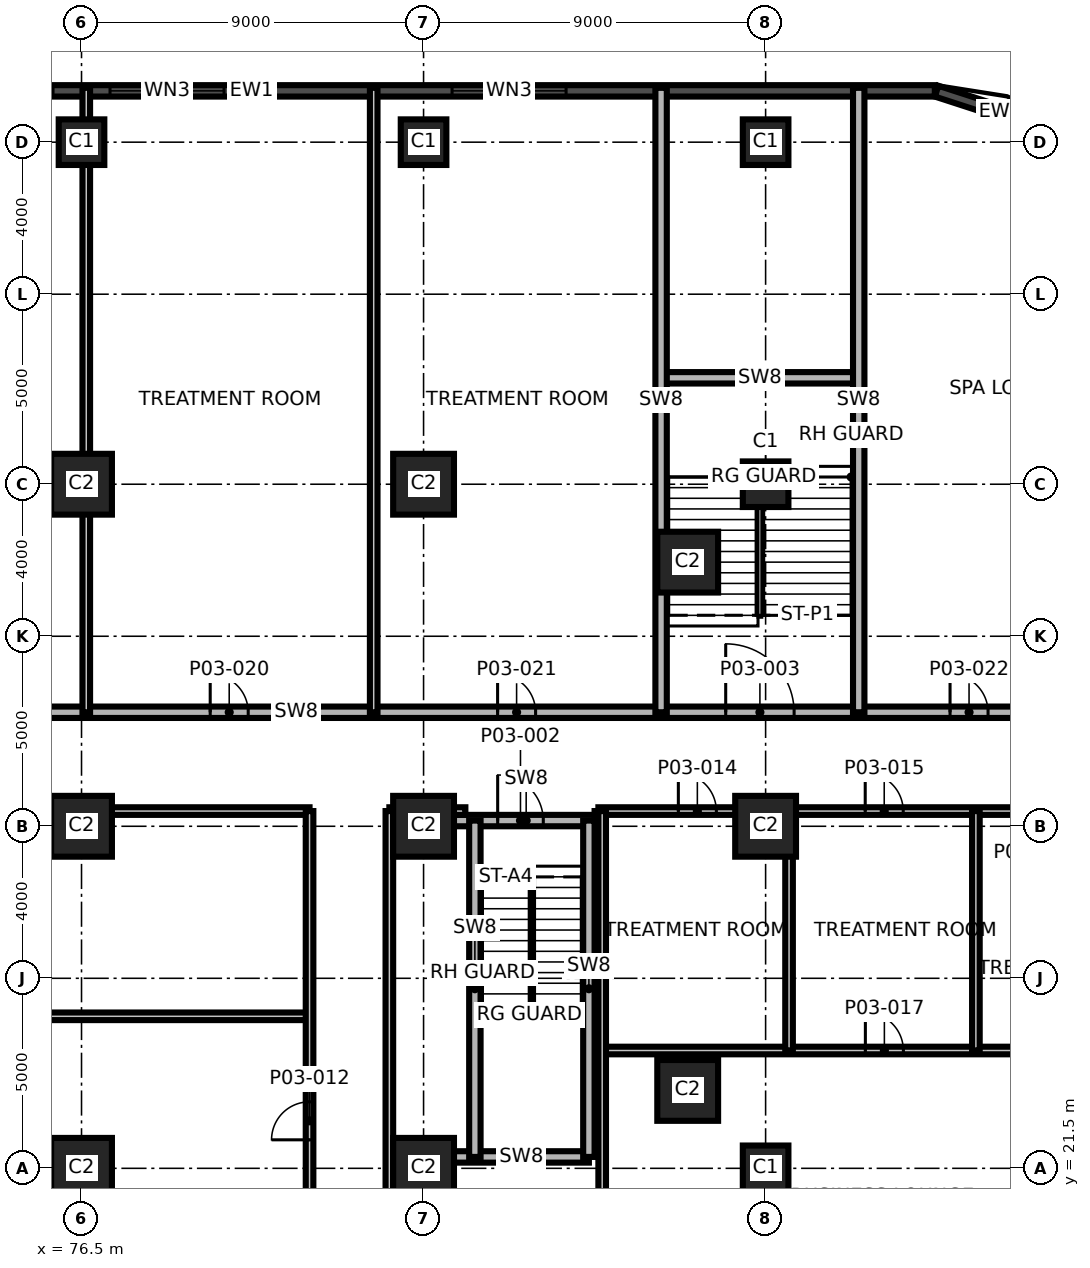
"""IFC4 building model, lengths in metres.
Left out: names, types, materials, properties, quantities, classifications, styles, units other than length and angle.
Written with IfcOpenShell. Run it as: python <this file> out.ifc"""

import sys

from ifc_helpers import new_model, si_unit, direction, frame, frame_2d, origin, origin_2d, place, context, subcontext, project, spatial, rectangle, extrude, element, fill, save


model = new_model("IFC4")
c1 = context("Model", 3, precision=1e-05, world=origin(), true_north=direction((0.0, 1.0)))
c2 = subcontext(c1, "Body", "Model", "MODEL_VIEW")
j1 = project(units=[si_unit("LENGTHUNIT", "METRE"), si_unit("PLANEANGLEUNIT", "RADIAN")], contexts=[c1])
p1 = place(None, origin())
s1 = spatial("IfcSite", under=j1, at=p1, CompositionType="ELEMENT")
p2 = place(p1, origin())
s2 = spatial("IfcBuilding", under=s1, at=p2, CompositionType="ELEMENT")
p3 = place(p2, frame((0.0, 0.0, 18.5)))
s3 = spatial("IfcBuildingStorey", under=s2, at=p3, CompositionType="ELEMENT", Elevation=18.5)
for number, where, z_axis, x_axis in (
    (1, (76.5, 21.5, 0.0), (0.0, 0.0, 1.0), (1.0, 0.0, 0.0)),
    (2, (85.5, 21.5, 0.0), (0.0, 0.0, 1.0), (1.0, 0.0, 0.0)),
):
    element("IfcColumn", number, at=place(p3, frame(where, z_axis=z_axis, x_axis=x_axis)), inside=s3, PredefinedType="COLUMN", context=c2, shape_type="SweptSolid", body=[
        extrude(rectangle(XDim=1.6, YDim=1.6, at=origin_2d()), origin(), (0.0, 0.0, 1.0), 5.0),
    ])
p4 = place(p3, frame((94.5, 21.5, 0.0), z_axis=(0.0, 0.0, 1.0), x_axis=(1.0, 0.0, 0.0)))
e3 = element("IfcColumn", 3, at=p4, inside=s3, PredefinedType="COLUMN", context=c2, shape_type="SweptSolid", body=[
    extrude(rectangle(XDim=1.2, YDim=1.2, at=origin_2d()), origin(), (0.0, 0.0, 1.0), 5.0),
])
for number, where, z_axis, x_axis in (
    (4, (76.5, 30.5, 0.0), (0.0, 0.0, 1.0), (1.0, 0.0, 0.0)),
    (5, (85.5, 30.5, 0.0), (0.0, 0.0, 1.0), (1.0, 0.0, 0.0)),
    (6, (94.5, 30.5, 0.0), (0.0, 0.0, 1.0), (1.0, 0.0, 0.0)),
    (7, (76.5, 39.5, 0.0), (0.0, 0.0, 1.0), (1.0, 0.0, 0.0)),
    (8, (85.5, 39.5, 0.0), (0.0, 0.0, 1.0), (1.0, 0.0, 0.0)),
):
    element("IfcColumn", number, at=place(p3, frame(where, z_axis=z_axis, x_axis=x_axis)), inside=s3, PredefinedType="COLUMN", context=c2, shape_type="SweptSolid", body=[
        extrude(rectangle(XDim=1.6, YDim=1.6, at=origin_2d()), origin(), (0.0, 0.0, 1.0), 5.0),
    ])
for number, where, z_axis, x_axis in (
    (9, (94.5, 39.5, 0.0), (0.0, 0.0, 1.0), (1.0, 0.0, 0.0)),
    (10, (76.5, 48.5, 0.0), (0.0, 0.0, 1.0), (1.0, 0.0, 0.0)),
    (11, (85.5, 48.5, 0.0), (0.0, 0.0, 1.0), (1.0, 0.0, 0.0)),
    (12, (94.5, 48.5, 0.0), (0.0, 0.0, 1.0), (1.0, 0.0, 0.0)),
):
    element("IfcColumn", number, at=place(p3, frame(where, z_axis=z_axis, x_axis=x_axis)), inside=s3, PredefinedType="COLUMN", context=c2, shape_type="SweptSolid", body=[
        extrude(rectangle(XDim=1.2, YDim=1.2, at=origin_2d()), origin(), (0.0, 0.0, 1.0), 5.0),
    ])
for number, where, z_axis, x_axis in (
    (13, (92.45, 23.55, 0.0), (0.0, 0.0, 1.0), (1.0, 0.0, 0.0)),
    (14, (92.45, 37.45, 0.0), (0.0, 0.0, 1.0), (1.0, 0.0, 0.0)),
):
    element("IfcColumn", number, at=place(p3, frame(where, z_axis=z_axis, x_axis=x_axis)), inside=s3, PredefinedType="COLUMN", context=c2, shape_type="SweptSolid", body=[
        extrude(rectangle(XDim=1.6, YDim=1.6, at=origin_2d()), origin(), (0.0, 0.0, 1.0), 5.0),
    ])
p5 = place(p3, frame((102.362, 48.75, 0.0), z_axis=(0.0, 0.0, 1.0), x_axis=(-0.951038127287, 0.309073584194, 0.0)))
e15 = element("IfcWall", 15, at=p5, inside=s3, PredefinedType="SOLIDWALL", context=c2, shape_type="SweptSolid", body=[
    extrude(rectangle(XDim=3.536, YDim=0.3, at=frame_2d((1.768, 0.0))), origin(), (0.0, 0.0, 1.0), 4.7),
])
p6 = place(p3, frame((98.952, 49.85, 0.0), z_axis=(0.0, 0.0, 1.0), x_axis=(-1.0, 0.0, 0.0)))
e16 = element("IfcWall", 16, at=p6, inside=s3, PredefinedType="SOLIDWALL", context=c2, shape_type="SweptSolid", body=[
    extrude(rectangle(XDim=35.952, YDim=0.3, at=frame_2d((17.976, 0.0))), origin(), (0.0, 0.0, 1.0), 4.7),
])
p7 = place(p6, frame((9.702, 0.0, 0.9)))
e17 = element("IfcOpeningElement", 17, at=p7, cuts=e16, PredefinedType="OPENING", context=c2, shape_type="SweptSolid", body=[
    extrude(rectangle(XDim=3.0, YDim=2.4, at=frame_2d((1.5, 1.2))), frame((0.0, 0.16, 0.0), z_axis=(0.0, -1.0, 0.0), x_axis=(1.0, 0.0, 0.0)), (0.0, 0.0, 1.0), 0.32),
])
p8 = place(p6, frame((18.702, 0.0, 0.9)))
e18 = element("IfcOpeningElement", 18, at=p8, cuts=e16, PredefinedType="OPENING", context=c2, shape_type="SweptSolid", body=[
    extrude(rectangle(XDim=3.0, YDim=2.4, at=frame_2d((1.5, 1.2))), frame((0.0, 0.16, 0.0), z_axis=(0.0, -1.0, 0.0), x_axis=(1.0, 0.0, 0.0)), (0.0, 0.0, 1.0), 0.32),
])
p9 = place(p6, frame((23.202, 0.0, 0.9)))
e19 = element("IfcOpeningElement", 19, at=p9, cuts=e16, PredefinedType="OPENING", context=c2, shape_type="SweptSolid", body=[
    extrude(rectangle(XDim=3.0, YDim=2.4, at=frame_2d((1.5, 1.2))), frame((0.0, 0.16, 0.0), z_axis=(0.0, -1.0, 0.0), x_axis=(1.0, 0.0, 0.0)), (0.0, 0.0, 1.0), 0.32),
])
p10 = place(p6, frame((32.226, 0.0, 0.9)))
e20 = element("IfcOpeningElement", 20, at=p10, cuts=e16, PredefinedType="OPENING", context=c2, shape_type="SweptSolid", body=[
    extrude(rectangle(XDim=3.0, YDim=2.4, at=frame_2d((1.5, 1.2))), frame((0.0, 0.16, 0.0), z_axis=(0.0, -1.0, 0.0), x_axis=(1.0, 0.0, 0.0)), (0.0, 0.0, 1.0), 0.32),
])
p11 = place(p3, frame((86.3, 21.8, 0.0), z_axis=(0.0, 0.0, 1.0), x_axis=(1.0, 0.0, 0.0)))
e21 = element("IfcWall", 21, at=p11, inside=s3, PredefinedType="SHEAR", context=c2, shape_type="SweptSolid", body=[
    extrude(rectangle(XDim=3.55, YDim=0.3, at=frame_2d((1.775, 0.0))), origin(), (0.0, 0.0, 1.0), 4.7),
])
p12 = place(p3, frame((90.2, 24.6, 0.0), z_axis=(0.0, 0.0, 1.0), x_axis=(1.0, 0.0, 0.0)))
e22 = element("IfcWall", 22, at=p12, inside=s3, PredefinedType="PARTITIONING", context=c2, shape_type="SweptSolid", body=[
    extrude(rectangle(XDim=14.73, YDim=0.2, at=frame_2d((7.365, 0.0))), origin(), (0.0, 0.0, 1.0), 4.7),
])
p13 = place(p12, frame((6.925, 0.0, 0.0)))
e23 = element("IfcOpeningElement", 23, at=p13, cuts=e22, PredefinedType="OPENING", context=c2, shape_type="SweptSolid", body=[
    extrude(rectangle(XDim=1.0, YDim=2.1, at=frame_2d((0.5, 1.05))), frame((0.0, 0.11, 0.0), z_axis=(0.0, -1.0, 0.0), x_axis=(1.0, 0.0, 0.0)), (0.0, 0.0, 1.0), 0.22),
])
p14 = place(p3, frame((59.05, 25.5, 0.0), z_axis=(0.0, 0.0, 1.0), x_axis=(1.0, 0.0, 0.0)))
e24 = element("IfcWall", 24, at=p14, inside=s3, PredefinedType="PARTITIONING", context=c2, shape_type="SweptSolid", body=[
    extrude(rectangle(XDim=23.45, YDim=0.2, at=frame_2d((11.725, 0.0))), origin(), (0.0, 0.0, 1.0), 4.7),
])
p15 = place(p3, frame((86.3, 30.65, 0.0), z_axis=(0.0, 0.0, 1.0), x_axis=(1.0, 0.0, 0.0)))
e25 = element("IfcWall", 25, at=p15, inside=s3, PredefinedType="SHEAR", context=c2, shape_type="SweptSolid", body=[
    extrude(rectangle(XDim=3.8, YDim=0.3, at=frame_2d((1.9, 0.0))), origin(), (0.0, 0.0, 1.0), 4.7),
])
p16 = place(p15, frame((1.15, 0.0, 0.0)))
e26 = element("IfcOpeningElement", 26, at=p16, cuts=e25, PredefinedType="OPENING", context=c2, shape_type="SweptSolid", body=[
    extrude(rectangle(XDim=1.2, YDim=2.1, at=frame_2d((0.6, 1.05))), frame((0.0, 0.16, 0.0), z_axis=(0.0, -1.0, 0.0), x_axis=(1.0, 0.0, 0.0)), (0.0, 0.0, 1.0), 0.32),
])
p17 = place(p3, frame((58.97, 30.9, 0.0), z_axis=(0.0, 0.0, 1.0), x_axis=(1.0, 0.0, 0.0)))
e27 = element("IfcWall", 27, at=p17, inside=s3, PredefinedType="PARTITIONING", context=c2, shape_type="SweptSolid", body=[
    extrude(rectangle(XDim=23.53, YDim=0.2, at=frame_2d((11.765, 0.0))), origin(), (0.0, 0.0, 1.0), 4.7),
])
p18 = place(p17, frame((13.98, 0.0, 0.0)))
e28 = element("IfcOpeningElement", 28, at=p18, cuts=e27, PredefinedType="OPENING", context=c2, shape_type="SweptSolid", body=[
    extrude(rectangle(XDim=1.0, YDim=2.1, at=frame_2d((0.5, 1.05))), frame((0.0, 0.11, 0.0), z_axis=(0.0, -1.0, 0.0), x_axis=(1.0, 0.0, 0.0)), (0.0, 0.0, 1.0), 0.22),
])
p19 = place(p3, frame((84.6, 30.9, 0.0), z_axis=(0.0, 0.0, 1.0), x_axis=(1.0, 0.0, 0.0)))
e29 = element("IfcWall", 29, at=p19, inside=s3, PredefinedType="PARTITIONING", context=c2, shape_type="SweptSolid", body=[
    extrude(rectangle(XDim=2.0, YDim=0.2, at=frame_2d((1.0, 0.0))), origin(), (0.0, 0.0, 1.0), 4.7),
])
p20 = place(p3, frame((90.1, 30.9, 0.0), z_axis=(0.0, 0.0, 1.0), x_axis=(1.0, 0.0, 0.0)))
e30 = element("IfcWall", 30, at=p20, inside=s3, PredefinedType="PARTITIONING", context=c2, shape_type="SweptSolid", body=[
    extrude(rectangle(XDim=14.83, YDim=0.2, at=frame_2d((7.415, 0.0))), origin(), (0.0, 0.0, 1.0), 2.7),
])
p21 = place(p20, frame((2.104, 0.0, 0.0)))
e31 = element("IfcOpeningElement", 31, at=p21, cuts=e30, PredefinedType="OPENING", context=c2, shape_type="SweptSolid", body=[
    extrude(rectangle(XDim=1.0, YDim=2.1, at=frame_2d((0.5, 1.05))), frame((0.0, 0.11, 0.0), z_axis=(0.0, -1.0, 0.0), x_axis=(1.0, 0.0, 0.0)), (0.0, 0.0, 1.0), 0.22),
])
p22 = place(p20, frame((7.021, 0.0, 0.0)))
e32 = element("IfcOpeningElement", 32, at=p22, cuts=e30, PredefinedType="OPENING", context=c2, shape_type="SweptSolid", body=[
    extrude(rectangle(XDim=1.0, YDim=2.1, at=frame_2d((0.5, 1.05))), frame((0.0, 0.11, 0.0), z_axis=(0.0, -1.0, 0.0), x_axis=(1.0, 0.0, 0.0)), (0.0, 0.0, 1.0), 0.22),
])
p23 = place(p20, frame((10.945, 0.0, 0.0)))
e33 = element("IfcOpeningElement", 33, at=p23, cuts=e30, PredefinedType="OPENING", context=c2, shape_type="SweptSolid", body=[
    extrude(rectangle(XDim=1.0, YDim=2.1, at=frame_2d((0.5, 1.05))), frame((0.0, 0.11, 0.0), z_axis=(0.0, -1.0, 0.0), x_axis=(1.0, 0.0, 0.0)), (0.0, 0.0, 1.0), 0.22),
])
p24 = place(p3, frame((61.5, 33.5, 0.0), z_axis=(0.0, 0.0, 1.0), x_axis=(1.0, 0.0, 0.0)))
e34 = element("IfcWall", 34, at=p24, inside=s3, PredefinedType="SHEAR", context=c2, shape_type="SweptSolid", body=[
    extrude(rectangle(XDim=41.3, YDim=0.3, at=frame_2d((20.65, 0.0))), origin(), (0.0, 0.0, 1.0), 4.7),
])
p25 = place(p24, frame((31.95, 0.0, 0.0)))
e35 = element("IfcOpeningElement", 35, at=p25, cuts=e34, PredefinedType="OPENING", context=c2, shape_type="SweptSolid", body=[
    extrude(rectangle(XDim=1.8, YDim=2.1, at=frame_2d((0.9, 1.05))), frame((0.0, 0.16, 0.0), z_axis=(0.0, -1.0, 0.0), x_axis=(1.0, 0.0, 0.0)), (0.0, 0.0, 1.0), 0.32),
])
p26 = place(p24, frame((10.823, 0.0, 0.0)))
e36 = element("IfcOpeningElement", 36, at=p26, cuts=e34, PredefinedType="OPENING", context=c2, shape_type="SweptSolid", body=[
    extrude(rectangle(XDim=1.0, YDim=2.1, at=frame_2d((0.5, 1.05))), frame((0.0, 0.16, 0.0), z_axis=(0.0, -1.0, 0.0), x_axis=(1.0, 0.0, 0.0)), (0.0, 0.0, 1.0), 0.32),
])
p27 = place(p24, frame((18.386, 0.0, 0.0)))
e37 = element("IfcOpeningElement", 37, at=p27, cuts=e34, PredefinedType="OPENING", context=c2, shape_type="SweptSolid", body=[
    extrude(rectangle(XDim=1.0, YDim=2.1, at=frame_2d((0.5, 1.05))), frame((0.0, 0.16, 0.0), z_axis=(0.0, -1.0, 0.0), x_axis=(1.0, 0.0, 0.0)), (0.0, 0.0, 1.0), 0.32),
])
p28 = place(p24, frame((25.948, 0.0, 0.0)))
e38 = element("IfcOpeningElement", 38, at=p28, cuts=e34, PredefinedType="OPENING", context=c2, shape_type="SweptSolid", body=[
    extrude(rectangle(XDim=1.0, YDim=2.1, at=frame_2d((0.5, 1.05))), frame((0.0, 0.16, 0.0), z_axis=(0.0, -1.0, 0.0), x_axis=(1.0, 0.0, 0.0)), (0.0, 0.0, 1.0), 0.32),
])
p29 = place(p24, frame((37.853, 0.0, 0.0)))
e39 = element("IfcOpeningElement", 39, at=p29, cuts=e34, PredefinedType="OPENING", context=c2, shape_type="SweptSolid", body=[
    extrude(rectangle(XDim=1.0, YDim=2.1, at=frame_2d((0.5, 1.05))), frame((0.0, 0.16, 0.0), z_axis=(0.0, -1.0, 0.0), x_axis=(1.0, 0.0, 0.0)), (0.0, 0.0, 1.0), 0.32),
])
p30 = place(p3, frame((91.75, 42.3, 0.0), z_axis=(0.0, 0.0, 1.0), x_axis=(1.0, 0.0, 0.0)))
e40 = element("IfcWall", 40, at=p30, inside=s3, PredefinedType="SHEAR", context=c2, shape_type="SweptSolid", body=[
    extrude(rectangle(XDim=5.2, YDim=0.3, at=frame_2d((2.6, 0.0))), origin(), (0.0, 0.0, 1.0), 4.7),
])
p31 = place(p3, frame((100.033, 24.6, 0.0), z_axis=(0.0, 0.0, 1.0), x_axis=(0.0, 1.0, 0.0)))
e41 = element("IfcWall", 41, at=p31, inside=s3, PredefinedType="PARTITIONING", context=c2, shape_type="SweptSolid", body=[
    extrude(rectangle(XDim=6.3, YDim=0.2, at=frame_2d((3.15, 0.0))), origin(), (0.0, 0.0, 1.0), 4.7),
])
p32 = place(p3, frame((76.625, 33.5, 0.0), z_axis=(0.0, 0.0, 1.0), x_axis=(0.0, 1.0, 0.0)))
e42 = element("IfcWall", 42, at=p32, inside=s3, PredefinedType="PARTITIONING", context=c2, shape_type="SweptSolid", body=[
    extrude(rectangle(XDim=16.43, YDim=0.2, at=frame_2d((8.215, 0.0))), origin(), (0.0, 0.0, 1.0), 4.7),
])
p33 = place(p3, frame((82.5, 11.07, 0.0), z_axis=(0.0, 0.0, 1.0), x_axis=(0.0, 1.0, 0.0)))
e43 = element("IfcWall", 43, at=p33, inside=s3, PredefinedType="PARTITIONING", context=c2, shape_type="SweptSolid", body=[
    extrude(rectangle(XDim=19.83, YDim=0.2, at=frame_2d((9.915, 0.0))), origin(), (0.0, 0.0, 1.0), 4.7),
])
p34 = place(p33, frame((6.78, 0.0, 0.0)))
e44 = element("IfcOpeningElement", 44, at=p34, cuts=e43, PredefinedType="OPENING", context=c2, shape_type="SweptSolid", body=[
    extrude(rectangle(XDim=1.6, YDim=2.1, at=frame_2d((0.8, 1.05))), frame((0.0, 0.11, 0.0), z_axis=(0.0, -1.0, 0.0), x_axis=(1.0, 0.0, 0.0)), (0.0, 0.0, 1.0), 0.22),
])
p35 = place(p33, frame((11.18, 0.0, 0.0)))
e45 = element("IfcOpeningElement", 45, at=p35, cuts=e43, PredefinedType="OPENING", context=c2, shape_type="SweptSolid", body=[
    extrude(rectangle(XDim=1.0, YDim=2.1, at=frame_2d((0.5, 1.05))), frame((0.0, 0.11, 0.0), z_axis=(0.0, -1.0, 0.0), x_axis=(1.0, 0.0, 0.0)), (0.0, 0.0, 1.0), 0.22),
])
p36 = place(p3, frame((84.188, 33.5, 0.0), z_axis=(0.0, 0.0, 1.0), x_axis=(0.0, 1.0, 0.0)))
e46 = element("IfcWall", 46, at=p36, inside=s3, PredefinedType="PARTITIONING", context=c2, shape_type="SweptSolid", body=[
    extrude(rectangle(XDim=16.43, YDim=0.2, at=frame_2d((8.215, 0.0))), origin(), (0.0, 0.0, 1.0), 4.7),
])
p37 = place(p3, frame((84.6, 17.4, 0.0), z_axis=(0.0, 0.0, 1.0), x_axis=(0.0, 1.0, 0.0)))
e47 = element("IfcWall", 47, at=p37, inside=s3, PredefinedType="PARTITIONING", context=c2, shape_type="SweptSolid", body=[
    extrude(rectangle(XDim=13.5, YDim=0.2, at=frame_2d((6.75, 0.0))), origin(), (0.0, 0.0, 1.0), 4.7),
])
for number, where, z_axis, x_axis in (
    (48, (86.85, 21.8, 0.0), (0.0, 0.0, 1.0), (0.0, 1.0, 0.0)),
    (49, (89.85, 21.8, 0.0), (0.0, 0.0, 1.0), (0.0, 1.0, 0.0)),
):
    element("IfcWall", number, at=place(p3, frame(where, z_axis=z_axis, x_axis=x_axis)), inside=s3, PredefinedType="SHEAR", context=c2, shape_type="SweptSolid", body=[
        extrude(rectangle(XDim=8.85, YDim=0.3, at=frame_2d((4.425, 0.0))), origin(), (0.0, 0.0, 1.0), 4.7),
    ])
p38 = place(p3, frame((90.1, 30.65, 0.0), z_axis=(0.0, 0.0, 1.0), x_axis=(0.0, 1.0, 0.0)))
e50 = element("IfcWall", 50, at=p38, inside=s3, PredefinedType="PARTITIONING", context=c2, shape_type="SweptSolid", body=[
    extrude(rectangle(XDim=0.25, YDim=0.2, at=frame_2d((0.125, 0.0))), origin(), (0.0, 0.0, 1.0), 4.7),
])
p39 = place(p3, frame((90.2, 11.07, 0.0), z_axis=(0.0, 0.0, 1.0), x_axis=(0.0, 1.0, 0.0)))
e51 = element("IfcWall", 51, at=p39, inside=s3, PredefinedType="PARTITIONING", context=c2, shape_type="SweptSolid", body=[
    extrude(rectangle(XDim=19.83, YDim=0.2, at=frame_2d((9.915, 0.0))), origin(), (0.0, 0.0, 1.0), 4.7),
])
p40 = place(p3, frame((91.75, 33.5, 0.0), z_axis=(0.0, 0.0, 1.0), x_axis=(0.0, 1.0, 0.0)))
e52 = element("IfcWall", 52, at=p40, inside=s3, PredefinedType="SHEAR", context=c2, shape_type="SweptSolid", body=[
    extrude(rectangle(XDim=16.43, YDim=0.3, at=frame_2d((8.215, 0.0))), origin(), (0.0, 0.0, 1.0), 4.7),
])
p41 = place(p3, frame((95.117, 24.6, 0.0), z_axis=(0.0, 0.0, 1.0), x_axis=(0.0, 1.0, 0.0)))
e53 = element("IfcWall", 53, at=p41, inside=s3, PredefinedType="PARTITIONING", context=c2, shape_type="SweptSolid", body=[
    extrude(rectangle(XDim=6.3, YDim=0.2, at=frame_2d((3.15, 0.0))), origin(), (0.0, 0.0, 1.0), 4.7),
])
p42 = place(p3, frame((96.95, 33.5, 0.0), z_axis=(0.0, 0.0, 1.0), x_axis=(0.0, 1.0, 0.0)))
e54 = element("IfcWall", 54, at=p42, inside=s3, PredefinedType="SHEAR", context=c2, shape_type="SweptSolid", body=[
    extrude(rectangle(XDim=16.43, YDim=0.3, at=frame_2d((8.215, 0.0))), origin(), (0.0, 0.0, 1.0), 4.7),
])
p43 = place(p7, origin())
e55 = element("IfcWindow", 55, at=p43, inside=s3, PartitioningType="SINGLE_PANEL", PredefinedType="WINDOW", context=c2, shape_type="SweptSolid", body=[
    extrude(rectangle(XDim=3.0, YDim=2.4, at=frame_2d((1.5, 1.2))), frame((0.0, 0.03, 0.0), z_axis=(0.0, -1.0, 0.0), x_axis=(1.0, 0.0, 0.0)), (0.0, 0.0, 1.0), 0.06),
])
fill(e17, e55)
p44 = place(p8, origin())
e56 = element("IfcWindow", 56, at=p44, inside=s3, PartitioningType="SINGLE_PANEL", PredefinedType="WINDOW", context=c2, shape_type="SweptSolid", body=[
    extrude(rectangle(XDim=3.0, YDim=2.4, at=frame_2d((1.5, 1.2))), frame((0.0, 0.03, 0.0), z_axis=(0.0, -1.0, 0.0), x_axis=(1.0, 0.0, 0.0)), (0.0, 0.0, 1.0), 0.06),
])
fill(e18, e56)
p45 = place(p9, origin())
e57 = element("IfcWindow", 57, at=p45, inside=s3, PartitioningType="SINGLE_PANEL", PredefinedType="WINDOW", context=c2, shape_type="SweptSolid", body=[
    extrude(rectangle(XDim=3.0, YDim=2.4, at=frame_2d((1.5, 1.2))), frame((0.0, 0.03, 0.0), z_axis=(0.0, -1.0, 0.0), x_axis=(1.0, 0.0, 0.0)), (0.0, 0.0, 1.0), 0.06),
])
fill(e19, e57)
p46 = place(p16, origin())
e58 = element("IfcDoor", 58, at=p46, inside=s3, OperationType="SINGLE_SWING_RIGHT", PredefinedType="DOOR", context=c2, shape_type="SweptSolid", body=[
    extrude(rectangle(XDim=1.2, YDim=2.1, at=frame_2d((0.6, 1.05))), frame((0.0, 0.025, 0.0), z_axis=(0.0, -1.0, 0.0), x_axis=(1.0, 0.0, 0.0)), (0.0, 0.0, 1.0), 0.05),
])
fill(e26, e58)
p47 = place(p25, origin())
e59 = element("IfcDoor", 59, at=p47, inside=s3, OperationType="SINGLE_SWING_LEFT", PredefinedType="DOOR", context=c2, shape_type="SweptSolid", body=[
    extrude(rectangle(XDim=1.8, YDim=2.1, at=frame_2d((0.9, 1.05))), frame((0.0, 0.025, 0.0), z_axis=(0.0, -1.0, 0.0), x_axis=(1.0, 0.0, 0.0)), (0.0, 0.0, 1.0), 0.05),
])
fill(e35, e59)
p48 = place(p35, origin())
e60 = element("IfcDoor", 60, at=p48, inside=s3, OperationType="SINGLE_SWING_RIGHT", PredefinedType="DOOR", context=c2, shape_type="SweptSolid", body=[
    extrude(rectangle(XDim=1.0, YDim=2.1, at=frame_2d((0.5, 1.05))), frame((0.0, 0.025, 0.0), z_axis=(0.0, -1.0, 0.0), x_axis=(1.0, 0.0, 0.0)), (0.0, 0.0, 1.0), 0.05),
])
fill(e45, e60)
p49 = place(p21, origin())
e61 = element("IfcDoor", 61, at=p49, inside=s3, OperationType="SINGLE_SWING_RIGHT", PredefinedType="DOOR", context=c2, shape_type="SweptSolid", body=[
    extrude(rectangle(XDim=1.0, YDim=2.1, at=frame_2d((0.5, 1.05))), frame((0.0, 0.025, 0.0), z_axis=(0.0, -1.0, 0.0), x_axis=(1.0, 0.0, 0.0)), (0.0, 0.0, 1.0), 0.05),
])
fill(e31, e61)
p50 = place(p22, origin())
e62 = element("IfcDoor", 62, at=p50, inside=s3, OperationType="SINGLE_SWING_LEFT", PredefinedType="DOOR", context=c2, shape_type="SweptSolid", body=[
    extrude(rectangle(XDim=1.0, YDim=2.1, at=frame_2d((0.5, 1.05))), frame((0.0, 0.025, 0.0), z_axis=(0.0, -1.0, 0.0), x_axis=(1.0, 0.0, 0.0)), (0.0, 0.0, 1.0), 0.05),
])
fill(e32, e62)
p51 = place(p13, origin())
e63 = element("IfcDoor", 63, at=p51, inside=s3, OperationType="SINGLE_SWING_LEFT", PredefinedType="DOOR", context=c2, shape_type="SweptSolid", body=[
    extrude(rectangle(XDim=1.0, YDim=2.1, at=frame_2d((0.5, 1.05))), frame((0.0, 0.025, 0.0), z_axis=(0.0, -1.0, 0.0), x_axis=(1.0, 0.0, 0.0)), (0.0, 0.0, 1.0), 0.05),
])
fill(e23, e63)
p52 = place(p27, origin())
e64 = element("IfcDoor", 64, at=p52, inside=s3, OperationType="SINGLE_SWING_RIGHT", PredefinedType="DOOR", context=c2, shape_type="SweptSolid", body=[
    extrude(rectangle(XDim=1.0, YDim=2.1, at=frame_2d((0.5, 1.05))), frame((0.0, 0.025, 0.0), z_axis=(0.0, -1.0, 0.0), x_axis=(1.0, 0.0, 0.0)), (0.0, 0.0, 1.0), 0.05),
])
fill(e37, e64)
p53 = place(p28, origin())
e65 = element("IfcDoor", 65, at=p53, inside=s3, OperationType="SINGLE_SWING_LEFT", PredefinedType="DOOR", context=c2, shape_type="SweptSolid", body=[
    extrude(rectangle(XDim=1.0, YDim=2.1, at=frame_2d((0.5, 1.05))), frame((0.0, 0.025, 0.0), z_axis=(0.0, -1.0, 0.0), x_axis=(1.0, 0.0, 0.0)), (0.0, 0.0, 1.0), 0.05),
])
fill(e38, e65)
p54 = place(p29, origin())
e66 = element("IfcDoor", 66, at=p54, inside=s3, OperationType="SINGLE_SWING_RIGHT", PredefinedType="DOOR", context=c2, shape_type="SweptSolid", body=[
    extrude(rectangle(XDim=1.0, YDim=2.1, at=frame_2d((0.5, 1.05))), frame((0.0, 0.025, 0.0), z_axis=(0.0, -1.0, 0.0), x_axis=(1.0, 0.0, 0.0)), (0.0, 0.0, 1.0), 0.05),
])
fill(e39, e66)
save(model, sys.argv[1])
